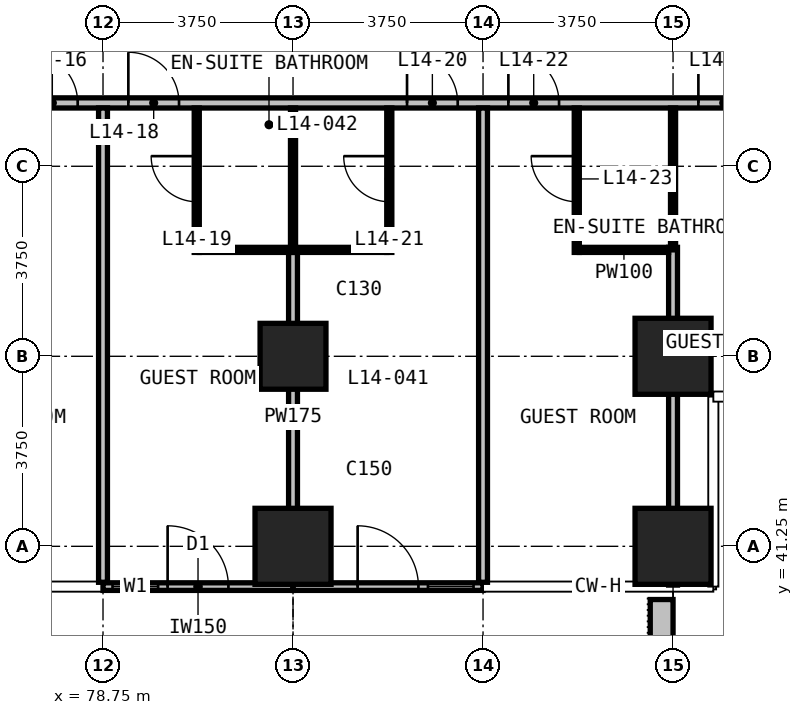
"""IFC4 building model, lengths in metres.
Left out: names, types, materials, properties, quantities, classifications, styles, units other than length and angle.
Written with IfcOpenShell. Run it as: python <this file> out.ifc"""

import sys

from ifc_helpers import new_model, si_unit, direction, frame, frame_2d, origin, origin_2d, place, context, subcontext, project, spatial, rectangle, extrude, element, fill, save


model = new_model("IFC4")
c1 = context("Model", 3, precision=1e-05, world=origin(), true_north=direction((0.0, 1.0)))
c2 = subcontext(c1, "Body", "Model", "MODEL_VIEW")
j1 = project(units=[si_unit("LENGTHUNIT", "METRE"), si_unit("PLANEANGLEUNIT", "RADIAN")], contexts=[c1])
p1 = place(None, origin())
s1 = spatial("IfcSite", under=j1, at=p1, CompositionType="ELEMENT")
p2 = place(p1, origin())
s2 = spatial("IfcBuilding", under=s1, at=p2, CompositionType="ELEMENT")
p3 = place(p2, frame((0.0, 0.0, 65.9)))
s3 = spatial("IfcBuildingStorey", under=s2, at=p3, CompositionType="ELEMENT", Elevation=65.9)
p4 = place(p3, frame((82.5, 41.25, 0.0), z_axis=(0.0, 0.0, 1.0), x_axis=(1.0, 0.0, 0.0)))
e1 = element("IfcColumn", 1, at=p4, inside=s3, PredefinedType="COLUMN", context=c2, shape_type="SweptSolid", body=[
    extrude(rectangle(XDim=1.5, YDim=1.5, at=origin_2d()), origin(), (0.0, 0.0, 1.0), 3.3),
])
p5 = place(p3, frame((82.5, 45.0, 0.0), z_axis=(0.0, 0.0, 1.0), x_axis=(1.0, 0.0, 0.0)))
e2 = element("IfcColumn", 2, at=p5, inside=s3, PredefinedType="COLUMN", context=c2, shape_type="SweptSolid", body=[
    extrude(rectangle(XDim=1.3, YDim=1.3, at=origin_2d()), origin(), (0.0, 0.0, 1.0), 3.3),
])
for number, where, z_axis, x_axis in (
    (3, (90.0, 41.25, 0.0), (0.0, 0.0, 1.0), (1.0, 0.0, 0.0)),
    (4, (90.0, 45.0, 0.0), (0.0, 0.0, 1.0), (1.0, 0.0, 0.0)),
):
    element("IfcColumn", number, at=place(p3, frame(where, z_axis=z_axis, x_axis=x_axis)), inside=s3, PredefinedType="COLUMN", context=c2, shape_type="SweptSolid", body=[
        extrude(rectangle(XDim=1.5, YDim=1.5, at=origin_2d()), origin(), (0.0, 0.0, 1.0), 3.3),
    ])
p6 = place(p3, frame((78.75, 40.455, 0.0), z_axis=(0.0, 0.0, 1.0), x_axis=(1.0, 0.0, 0.0)))
e5 = element("IfcWall", 5, at=p6, inside=s3, PredefinedType="SOLIDWALL", context=c2, shape_type="SweptSolid", body=[
    extrude(rectangle(XDim=3.75, YDim=0.15, at=frame_2d((1.875, 0.0))), origin(), (0.0, 0.0, 1.0), 3.0),
])
p7 = place(p6, frame((0.188, 0.0, 0.1)))
e6 = element("IfcOpeningElement", 6, at=p7, cuts=e5, PredefinedType="OPENING", context=c2, shape_type="SweptSolid", body=[
    extrude(rectangle(XDim=0.9, YDim=2.4, at=frame_2d((0.45, 1.2))), frame((0.0, 0.085, 0.0), z_axis=(0.0, -1.0, 0.0), x_axis=(1.0, 0.0, 0.0)), (0.0, 0.0, 1.0), 0.17),
])
p8 = place(p6, frame((1.275, 0.0, 0.0)))
e7 = element("IfcOpeningElement", 7, at=p8, cuts=e5, PredefinedType="OPENING", context=c2, shape_type="SweptSolid", body=[
    extrude(rectangle(XDim=1.2, YDim=2.4, at=frame_2d((0.6, 1.2))), frame((0.0, 0.085, 0.0), z_axis=(0.0, -1.0, 0.0), x_axis=(1.0, 0.0, 0.0)), (0.0, 0.0, 1.0), 0.17),
])
p9 = place(p3, frame((82.5, 40.455, 0.0), z_axis=(0.0, 0.0, 1.0), x_axis=(1.0, 0.0, 0.0)))
e8 = element("IfcWall", 8, at=p9, inside=s3, PredefinedType="SOLIDWALL", context=c2, shape_type="SweptSolid", body=[
    extrude(rectangle(XDim=3.75, YDim=0.15, at=frame_2d((1.875, 0.0))), origin(), (0.0, 0.0, 1.0), 3.0),
])
p10 = place(p9, frame((1.275, 0.0, 0.0)))
e9 = element("IfcOpeningElement", 9, at=p10, cuts=e8, PredefinedType="OPENING", context=c2, shape_type="SweptSolid", body=[
    extrude(rectangle(XDim=1.2, YDim=2.4, at=frame_2d((0.6, 1.2))), frame((0.0, 0.085, 0.0), z_axis=(0.0, -1.0, 0.0), x_axis=(1.0, 0.0, 0.0)), (0.0, 0.0, 1.0), 0.17),
])
p11 = place(p9, frame((2.663, 0.0, 0.1)))
e10 = element("IfcOpeningElement", 10, at=p11, cuts=e8, PredefinedType="OPENING", context=c2, shape_type="SweptSolid", body=[
    extrude(rectangle(XDim=0.9, YDim=2.4, at=frame_2d((0.45, 1.2))), frame((0.0, 0.085, 0.0), z_axis=(0.0, -1.0, 0.0), x_axis=(1.0, 0.0, 0.0)), (0.0, 0.0, 1.0), 0.17),
])
p12 = place(p3, frame((89.775, 40.2, 0.0), z_axis=(0.0, 0.0, 1.0), x_axis=(0.0, -1.0, 0.0)))
e11 = element("IfcWall", 11, at=p12, inside=s3, PredefinedType="USERDEFINED", context=c2, shape_type="SweptSolid", body=[
    extrude(rectangle(XDim=2.35, YDim=0.45, at=frame_2d((1.175, 0.0))), origin(), (0.0, 0.0, 1.0), 1.1),
])
p13 = place(p3, frame((51.735, 50.0, 0.0), z_axis=(0.0, 0.0, 1.0), x_axis=(1.0, 0.0, 0.0)))
e12 = element("IfcWall", 12, at=p13, inside=s3, PredefinedType="PARTITIONING", context=c2, shape_type="SweptSolid", body=[
    extrude(rectangle(XDim=46.53, YDim=0.2, at=frame_2d((23.265, 0.0))), origin(), (0.0, 0.0, 1.0), 3.0),
])
p14 = place(p13, frame((6.765, 0.0, 0.0)))
e13 = element("IfcOpeningElement", 13, at=p14, cuts=e12, PredefinedType="OPENING", context=c2, shape_type="SweptSolid", body=[
    extrude(rectangle(XDim=1.0, YDim=2.2, at=frame_2d((0.5, 1.1))), frame((0.0, 0.11, 0.0), z_axis=(0.0, -1.0, 0.0), x_axis=(1.0, 0.0, 0.0)), (0.0, 0.0, 1.0), 0.22),
])
p15 = place(p13, frame((10.515, 0.0, 0.0)))
e14 = element("IfcOpeningElement", 14, at=p15, cuts=e12, PredefinedType="OPENING", context=c2, shape_type="SweptSolid", body=[
    extrude(rectangle(XDim=1.0, YDim=2.2, at=frame_2d((0.5, 1.1))), frame((0.0, 0.11, 0.0), z_axis=(0.0, -1.0, 0.0), x_axis=(1.0, 0.0, 0.0)), (0.0, 0.0, 1.0), 0.22),
])
p16 = place(p13, frame((12.515, 0.0, 0.0)))
e15 = element("IfcOpeningElement", 15, at=p16, cuts=e12, PredefinedType="OPENING", context=c2, shape_type="SweptSolid", body=[
    extrude(rectangle(XDim=1.0, YDim=2.2, at=frame_2d((0.5, 1.1))), frame((0.0, 0.11, 0.0), z_axis=(0.0, -1.0, 0.0), x_axis=(1.0, 0.0, 0.0)), (0.0, 0.0, 1.0), 0.22),
])
p17 = place(p13, frame((18.015, 0.0, 0.0)))
e16 = element("IfcOpeningElement", 16, at=p17, cuts=e12, PredefinedType="OPENING", context=c2, shape_type="SweptSolid", body=[
    extrude(rectangle(XDim=1.0, YDim=2.2, at=frame_2d((0.5, 1.1))), frame((0.0, 0.11, 0.0), z_axis=(0.0, -1.0, 0.0), x_axis=(1.0, 0.0, 0.0)), (0.0, 0.0, 1.0), 0.22),
])
p18 = place(p13, frame((20.015, 0.0, 0.0)))
e17 = element("IfcOpeningElement", 17, at=p18, cuts=e12, PredefinedType="OPENING", context=c2, shape_type="SweptSolid", body=[
    extrude(rectangle(XDim=1.0, YDim=2.2, at=frame_2d((0.5, 1.1))), frame((0.0, 0.11, 0.0), z_axis=(0.0, -1.0, 0.0), x_axis=(1.0, 0.0, 0.0)), (0.0, 0.0, 1.0), 0.22),
])
p19 = place(p13, frame((25.515, 0.0, 0.0)))
e18 = element("IfcOpeningElement", 18, at=p19, cuts=e12, PredefinedType="OPENING", context=c2, shape_type="SweptSolid", body=[
    extrude(rectangle(XDim=1.0, YDim=2.2, at=frame_2d((0.5, 1.1))), frame((0.0, 0.11, 0.0), z_axis=(0.0, -1.0, 0.0), x_axis=(1.0, 0.0, 0.0)), (0.0, 0.0, 1.0), 0.22),
])
p20 = place(p13, frame((27.515, 0.0, 0.0)))
e19 = element("IfcOpeningElement", 19, at=p20, cuts=e12, PredefinedType="OPENING", context=c2, shape_type="SweptSolid", body=[
    extrude(rectangle(XDim=1.0, YDim=2.2, at=frame_2d((0.5, 1.1))), frame((0.0, 0.11, 0.0), z_axis=(0.0, -1.0, 0.0), x_axis=(1.0, 0.0, 0.0)), (0.0, 0.0, 1.0), 0.22),
])
p21 = place(p13, frame((33.015, 0.0, 0.0)))
e20 = element("IfcOpeningElement", 20, at=p21, cuts=e12, PredefinedType="OPENING", context=c2, shape_type="SweptSolid", body=[
    extrude(rectangle(XDim=1.0, YDim=2.2, at=frame_2d((0.5, 1.1))), frame((0.0, 0.11, 0.0), z_axis=(0.0, -1.0, 0.0), x_axis=(1.0, 0.0, 0.0)), (0.0, 0.0, 1.0), 0.22),
])
p22 = place(p13, frame((35.015, 0.0, 0.0)))
e21 = element("IfcOpeningElement", 21, at=p22, cuts=e12, PredefinedType="OPENING", context=c2, shape_type="SweptSolid", body=[
    extrude(rectangle(XDim=1.0, YDim=2.2, at=frame_2d((0.5, 1.1))), frame((0.0, 0.11, 0.0), z_axis=(0.0, -1.0, 0.0), x_axis=(1.0, 0.0, 0.0)), (0.0, 0.0, 1.0), 0.22),
])
p23 = place(p13, frame((38.765, 0.0, 0.0)))
e22 = element("IfcOpeningElement", 22, at=p23, cuts=e12, PredefinedType="OPENING", context=c2, shape_type="SweptSolid", body=[
    extrude(rectangle(XDim=1.0, YDim=2.2, at=frame_2d((0.5, 1.1))), frame((0.0, 0.11, 0.0), z_axis=(0.0, -1.0, 0.0), x_axis=(1.0, 0.0, 0.0)), (0.0, 0.0, 1.0), 0.22),
])
p24 = place(p13, frame((1.8, 0.0, 0.0)))
e23 = element("IfcOpeningElement", 23, at=p24, cuts=e12, PredefinedType="OPENING", context=c2, shape_type="SweptSolid", body=[
    extrude(rectangle(XDim=0.9, YDim=2.2, at=frame_2d((0.45, 1.1))), frame((0.0, 0.11, 0.0), z_axis=(0.0, -1.0, 0.0), x_axis=(1.0, 0.0, 0.0)), (0.0, 0.0, 1.0), 0.22),
])
p25 = place(p13, frame((43.815, 0.0, 0.0)))
e24 = element("IfcOpeningElement", 24, at=p25, cuts=e12, PredefinedType="OPENING", context=c2, shape_type="SweptSolid", body=[
    extrude(rectangle(XDim=0.9, YDim=2.2, at=frame_2d((0.45, 1.1))), frame((0.0, 0.11, 0.0), z_axis=(0.0, -1.0, 0.0), x_axis=(1.0, 0.0, 0.0)), (0.0, 0.0, 1.0), 0.22),
])
p26 = place(p3, frame((78.75, 40.54, 0.0), z_axis=(0.0, 0.0, 1.0), x_axis=(0.0, 1.0, 0.0)))
e25 = element("IfcWall", 25, at=p26, inside=s3, PredefinedType="PARTITIONING", context=c2, shape_type="SweptSolid", body=[
    extrude(rectangle(XDim=9.36, YDim=0.175, at=frame_2d((4.68, 0.0))), origin(), (0.0, 0.0, 1.0), 3.0),
])
p27 = place(p3, frame((82.5, 40.54, 0.0), z_axis=(0.0, 0.0, 1.0), x_axis=(0.0, 1.0, 0.0)))
e26 = element("IfcWall", 26, at=p27, inside=s3, PredefinedType="PARTITIONING", context=c2, shape_type="SweptSolid", body=[
    extrude(rectangle(XDim=6.51, YDim=0.175, at=frame_2d((3.255, 0.0))), origin(), (0.0, 0.0, 1.0), 3.0),
])
p28 = place(p3, frame((86.25, 40.54, 0.0), z_axis=(0.0, 0.0, 1.0), x_axis=(0.0, 1.0, 0.0)))
e27 = element("IfcWall", 27, at=p28, inside=s3, PredefinedType="PARTITIONING", context=c2, shape_type="SweptSolid", body=[
    extrude(rectangle(XDim=9.36, YDim=0.175, at=frame_2d((4.68, 0.0))), origin(), (0.0, 0.0, 1.0), 3.0),
])
p29 = place(p3, frame((90.0, 40.485, 0.0), z_axis=(0.0, 0.0, 1.0), x_axis=(0.0, 1.0, 0.0)))
e28 = element("IfcWall", 28, at=p29, inside=s3, PredefinedType="PARTITIONING", context=c2, shape_type="SweptSolid", body=[
    extrude(rectangle(XDim=6.665, YDim=0.175, at=frame_2d((3.333, 0.0))), origin(), (0.0, 0.0, 1.0), 3.0),
])
p30 = place(p3, frame((80.65, 47.1, 0.0), z_axis=(0.0, 0.0, 1.0), x_axis=(1.0, 0.0, 0.0)))
e29 = element("IfcWall", 29, at=p30, inside=s3, PredefinedType="PARTITIONING", context=c2, shape_type="SweptSolid", body=[
    extrude(rectangle(XDim=3.7, YDim=0.1, at=frame_2d((1.85, 0.0))), origin(), (0.0, 0.0, 1.0), 3.0),
])
p31 = place(p3, frame((88.15, 47.1, 0.0), z_axis=(0.0, 0.0, 1.0), x_axis=(1.0, 0.0, 0.0)))
e30 = element("IfcWall", 30, at=p31, inside=s3, PredefinedType="PARTITIONING", context=c2, shape_type="SweptSolid", body=[
    extrude(rectangle(XDim=1.762, YDim=0.1, at=frame_2d((0.881, 0.0))), origin(), (0.0, 0.0, 1.0), 3.0),
])
p32 = place(p3, frame((80.6, 47.05, 0.0), z_axis=(0.0, 0.0, 1.0), x_axis=(0.0, 1.0, 0.0)))
e31 = element("IfcWall", 31, at=p32, inside=s3, PredefinedType="PARTITIONING", context=c2, shape_type="SweptSolid", body=[
    extrude(rectangle(XDim=2.85, YDim=0.1, at=frame_2d((1.425, 0.0))), origin(), (0.0, 0.0, 1.0), 3.0),
])
p33 = place(p32, frame((1.0, 0.0, 0.0)))
e32 = element("IfcOpeningElement", 32, at=p33, cuts=e31, PredefinedType="OPENING", context=c2, shape_type="SweptSolid", body=[
    extrude(rectangle(XDim=0.9, YDim=2.2, at=frame_2d((0.45, 1.1))), frame((0.0, 0.06, 0.0), z_axis=(0.0, -1.0, 0.0), x_axis=(1.0, 0.0, 0.0)), (0.0, 0.0, 1.0), 0.12),
])
p34 = place(p3, frame((82.5, 47.15, 0.0), z_axis=(0.0, 0.0, 1.0), x_axis=(0.0, 1.0, 0.0)))
e33 = element("IfcWall", 33, at=p34, inside=s3, PredefinedType="PARTITIONING", context=c2, shape_type="SweptSolid", body=[
    extrude(rectangle(XDim=2.75, YDim=0.1, at=frame_2d((1.375, 0.0))), origin(), (0.0, 0.0, 1.0), 3.0),
])
p35 = place(p3, frame((84.4, 47.05, 0.0), z_axis=(0.0, 0.0, 1.0), x_axis=(0.0, 1.0, 0.0)))
e34 = element("IfcWall", 34, at=p35, inside=s3, PredefinedType="PARTITIONING", context=c2, shape_type="SweptSolid", body=[
    extrude(rectangle(XDim=2.85, YDim=0.1, at=frame_2d((1.425, 0.0))), origin(), (0.0, 0.0, 1.0), 3.0),
])
p36 = place(p35, frame((1.0, 0.0, 0.0)))
e35 = element("IfcOpeningElement", 35, at=p36, cuts=e34, PredefinedType="OPENING", context=c2, shape_type="SweptSolid", body=[
    extrude(rectangle(XDim=0.9, YDim=2.2, at=frame_2d((0.45, 1.1))), frame((0.0, 0.06, 0.0), z_axis=(0.0, -1.0, 0.0), x_axis=(1.0, 0.0, 0.0)), (0.0, 0.0, 1.0), 0.12),
])
p37 = place(p3, frame((88.1, 47.05, 0.0), z_axis=(0.0, 0.0, 1.0), x_axis=(0.0, 1.0, 0.0)))
e36 = element("IfcWall", 36, at=p37, inside=s3, PredefinedType="PARTITIONING", context=c2, shape_type="SweptSolid", body=[
    extrude(rectangle(XDim=2.85, YDim=0.1, at=frame_2d((1.425, 0.0))), origin(), (0.0, 0.0, 1.0), 3.0),
])
p38 = place(p37, frame((1.0, 0.0, 0.0)))
e37 = element("IfcOpeningElement", 37, at=p38, cuts=e36, PredefinedType="OPENING", context=c2, shape_type="SweptSolid", body=[
    extrude(rectangle(XDim=0.9, YDim=2.2, at=frame_2d((0.45, 1.1))), frame((0.0, 0.06, 0.0), z_axis=(0.0, -1.0, 0.0), x_axis=(1.0, 0.0, 0.0)), (0.0, 0.0, 1.0), 0.12),
])
p39 = place(p3, frame((90.0, 47.1, 0.0), z_axis=(0.0, 0.0, 1.0), x_axis=(0.0, 1.0, 0.0)))
e38 = element("IfcWall", 38, at=p39, inside=s3, PredefinedType="PARTITIONING", context=c2, shape_type="SweptSolid", body=[
    extrude(rectangle(XDim=2.8, YDim=0.1, at=frame_2d((1.4, 0.0))), origin(), (0.0, 0.0, 1.0), 3.0),
])
p40 = place(p7, origin())
e39 = element("IfcWindow", 39, at=p40, inside=s3, PartitioningType="SINGLE_PANEL", PredefinedType="WINDOW", context=c2, shape_type="SweptSolid", body=[
    extrude(rectangle(XDim=0.9, YDim=2.4, at=frame_2d((0.45, 1.2))), frame((0.0, 0.03, 0.0), z_axis=(0.0, -1.0, 0.0), x_axis=(1.0, 0.0, 0.0)), (0.0, 0.0, 1.0), 0.06),
])
fill(e6, e39)
p41 = place(p8, origin())
e40 = element("IfcDoor", 40, at=p41, inside=s3, OperationType="SINGLE_SWING_LEFT", PredefinedType="DOOR", context=c2, shape_type="SweptSolid", body=[
    extrude(rectangle(XDim=1.2, YDim=2.4, at=frame_2d((0.6, 1.2))), frame((0.0, 0.025, 0.0), z_axis=(0.0, -1.0, 0.0), x_axis=(1.0, 0.0, 0.0)), (0.0, 0.0, 1.0), 0.05),
])
fill(e7, e40)
p42 = place(p10, origin())
e41 = element("IfcDoor", 41, at=p42, inside=s3, OperationType="SINGLE_SWING_LEFT", PredefinedType="DOOR", context=c2, shape_type="SweptSolid", body=[
    extrude(rectangle(XDim=1.2, YDim=2.4, at=frame_2d((0.6, 1.2))), frame((0.0, 0.025, 0.0), z_axis=(0.0, -1.0, 0.0), x_axis=(1.0, 0.0, 0.0)), (0.0, 0.0, 1.0), 0.05),
])
fill(e9, e41)
p43 = place(p11, origin())
e42 = element("IfcWindow", 42, at=p43, inside=s3, PartitioningType="SINGLE_PANEL", PredefinedType="WINDOW", context=c2, shape_type="SweptSolid", body=[
    extrude(rectangle(XDim=0.9, YDim=2.4, at=frame_2d((0.45, 1.2))), frame((0.0, 0.03, 0.0), z_axis=(0.0, -1.0, 0.0), x_axis=(1.0, 0.0, 0.0)), (0.0, 0.0, 1.0), 0.06),
])
fill(e10, e42)
p44 = place(p19, origin())
e43 = element("IfcDoor", 43, at=p44, inside=s3, OperationType="SINGLE_SWING_LEFT", PredefinedType="DOOR", context=c2, shape_type="SweptSolid", body=[
    extrude(rectangle(XDim=1.0, YDim=2.2, at=frame_2d((0.5, 1.1))), frame((0.0, 0.025, 0.0), z_axis=(0.0, -1.0, 0.0), x_axis=(1.0, 0.0, 0.0)), (0.0, 0.0, 1.0), 0.05),
])
fill(e18, e43)
p45 = place(p20, origin())
e44 = element("IfcDoor", 44, at=p45, inside=s3, OperationType="SINGLE_SWING_RIGHT", PredefinedType="DOOR", context=c2, shape_type="SweptSolid", body=[
    extrude(rectangle(XDim=1.0, YDim=2.2, at=frame_2d((0.5, 1.1))), frame((0.0, 0.025, 0.0), z_axis=(0.0, -1.0, 0.0), x_axis=(1.0, 0.0, 0.0)), (0.0, 0.0, 1.0), 0.05),
])
fill(e19, e44)
p46 = place(p33, origin())
e45 = element("IfcDoor", 45, at=p46, inside=s3, OperationType="SINGLE_SWING_RIGHT", PredefinedType="DOOR", context=c2, shape_type="SweptSolid", body=[
    extrude(rectangle(XDim=0.9, YDim=2.2, at=frame_2d((0.45, 1.1))), frame((0.0, 0.025, 0.0), z_axis=(0.0, -1.0, 0.0), x_axis=(1.0, 0.0, 0.0)), (0.0, 0.0, 1.0), 0.05),
])
fill(e32, e45)
p47 = place(p21, origin())
e46 = element("IfcDoor", 46, at=p47, inside=s3, OperationType="SINGLE_SWING_RIGHT", PredefinedType="DOOR", context=c2, shape_type="SweptSolid", body=[
    extrude(rectangle(XDim=1.0, YDim=2.2, at=frame_2d((0.5, 1.1))), frame((0.0, 0.025, 0.0), z_axis=(0.0, -1.0, 0.0), x_axis=(1.0, 0.0, 0.0)), (0.0, 0.0, 1.0), 0.05),
])
fill(e20, e46)
p48 = place(p36, origin())
e47 = element("IfcDoor", 47, at=p48, inside=s3, OperationType="SINGLE_SWING_RIGHT", PredefinedType="DOOR", context=c2, shape_type="SweptSolid", body=[
    extrude(rectangle(XDim=0.9, YDim=2.2, at=frame_2d((0.45, 1.1))), frame((0.0, 0.025, 0.0), z_axis=(0.0, -1.0, 0.0), x_axis=(1.0, 0.0, 0.0)), (0.0, 0.0, 1.0), 0.05),
])
fill(e35, e47)
p49 = place(p22, origin())
e48 = element("IfcDoor", 48, at=p49, inside=s3, OperationType="SINGLE_SWING_LEFT", PredefinedType="DOOR", context=c2, shape_type="SweptSolid", body=[
    extrude(rectangle(XDim=1.0, YDim=2.2, at=frame_2d((0.5, 1.1))), frame((0.0, 0.025, 0.0), z_axis=(0.0, -1.0, 0.0), x_axis=(1.0, 0.0, 0.0)), (0.0, 0.0, 1.0), 0.05),
])
fill(e21, e48)
p50 = place(p38, origin())
e49 = element("IfcDoor", 49, at=p50, inside=s3, OperationType="SINGLE_SWING_RIGHT", PredefinedType="DOOR", context=c2, shape_type="SweptSolid", body=[
    extrude(rectangle(XDim=0.9, YDim=2.2, at=frame_2d((0.45, 1.1))), frame((0.0, 0.025, 0.0), z_axis=(0.0, -1.0, 0.0), x_axis=(1.0, 0.0, 0.0)), (0.0, 0.0, 1.0), 0.05),
])
fill(e37, e49)
p51 = place(p23, origin())
e50 = element("IfcDoor", 50, at=p51, inside=s3, OperationType="SINGLE_SWING_LEFT", PredefinedType="DOOR", context=c2, shape_type="SweptSolid", body=[
    extrude(rectangle(XDim=1.0, YDim=2.2, at=frame_2d((0.5, 1.1))), frame((0.0, 0.025, 0.0), z_axis=(0.0, -1.0, 0.0), x_axis=(1.0, 0.0, 0.0)), (0.0, 0.0, 1.0), 0.05),
])
fill(e22, e50)
save(model, sys.argv[1])
